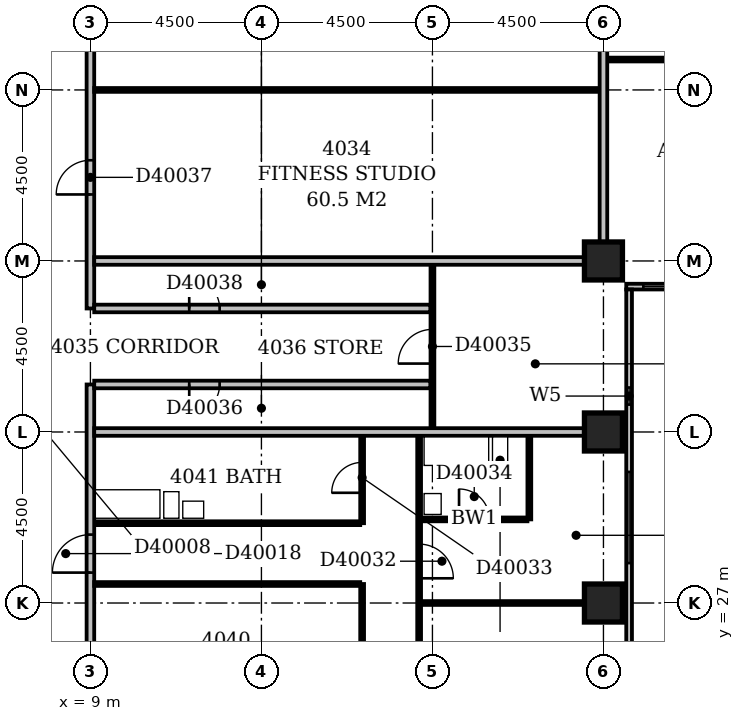
"""IFC4 building model, lengths in metres.
Left out: names, types, materials, properties, quantities, classifications, styles, units other than length and angle.
Written with IfcOpenShell. Run it as: python <this file> out.ifc"""

import sys

from ifc_helpers import new_model, si_unit, direction, frame, frame_2d, origin, origin_2d, place, context, subcontext, project, spatial, rectangle, extrude, element, fill, save


model = new_model("IFC4")
c1 = context("Model", 3, precision=1e-05, world=origin(), true_north=direction((0.0, 1.0)))
c2 = subcontext(c1, "Body", "Model", "MODEL_VIEW")
j1 = project(units=[si_unit("LENGTHUNIT", "METRE"), si_unit("PLANEANGLEUNIT", "RADIAN")], contexts=[c1])
p1 = place(None, origin())
s1 = spatial("IfcSite", under=j1, at=p1, CompositionType="ELEMENT")
p2 = place(p1, origin())
s2 = spatial("IfcBuilding", under=s1, at=p2, CompositionType="ELEMENT")
p3 = place(p2, frame((0.0, 0.0, 159.2)))
s3 = spatial("IfcBuildingStorey", under=s2, at=p3, CompositionType="ELEMENT", Elevation=159.2)
for number, where, z_axis, x_axis in (
    (1, (22.5, 27.0, -0.3), (0.0, 0.0, 1.0), (1.0, 0.0, 0.0)),
    (2, (22.5, 31.5, -0.3), (0.0, 0.0, 1.0), (1.0, 0.0, 0.0)),
    (3, (22.5, 36.0, -0.3), (0.0, 0.0, 1.0), (1.0, 0.0, 0.0)),
):
    element("IfcColumn", number, at=place(p3, frame(where, z_axis=z_axis, x_axis=x_axis)), inside=s3, PredefinedType="COLUMN", context=c2, shape_type="SweptSolid", body=[
        extrude(rectangle(XDim=1.0, YDim=1.0, at=origin_2d()), origin(), (0.0, 0.0, 1.0), 3.6),
    ])
p4 = place(p3, frame((23.175, 17.4, 0.0), z_axis=(0.0, 0.0, 1.0), x_axis=(0.0, 1.0, 0.0)))
e4 = element("IfcWall", 4, at=p4, inside=s3, PredefinedType="STANDARD", context=c2, shape_type="SweptSolid", body=[
    extrude(rectangle(XDim=17.85, YDim=0.15, at=frame_2d((8.925, 0.0))), origin(), (0.0, 0.0, 1.0), 2.7),
])
p5 = place(p4, frame((1.65, 0.0, 0.6)))
e5 = element("IfcOpeningElement", 5, at=p5, cuts=e4, PredefinedType="OPENING", context=c2, shape_type="SweptSolid", body=[
    extrude(rectangle(XDim=2.4, YDim=1.8, at=frame_2d((1.2, 0.9))), frame((0.0, 0.087, 0.0), z_axis=(0.0, -1.0, 0.0), x_axis=(1.0, 0.0, 0.0)), (0.0, 0.0, 1.0), 0.174),
])
p6 = place(p4, frame((6.15, 0.0, 0.6)))
e6 = element("IfcOpeningElement", 6, at=p6, cuts=e4, PredefinedType="OPENING", context=c2, shape_type="SweptSolid", body=[
    extrude(rectangle(XDim=2.4, YDim=1.8, at=frame_2d((1.2, 0.9))), frame((0.0, 0.087, 0.0), z_axis=(0.0, -1.0, 0.0), x_axis=(1.0, 0.0, 0.0)), (0.0, 0.0, 1.0), 0.174),
])
p7 = place(p4, frame((10.65, 0.0, 0.6)))
e7 = element("IfcOpeningElement", 7, at=p7, cuts=e4, PredefinedType="OPENING", context=c2, shape_type="SweptSolid", body=[
    extrude(rectangle(XDim=2.4, YDim=1.8, at=frame_2d((1.2, 0.9))), frame((0.0, 0.087, 0.0), z_axis=(0.0, -1.0, 0.0), x_axis=(1.0, 0.0, 0.0)), (0.0, 0.0, 1.0), 0.174),
])
p8 = place(p4, frame((14.82, 0.0, 0.6)))
e8 = element("IfcOpeningElement", 8, at=p8, cuts=e4, PredefinedType="OPENING", context=c2, shape_type="SweptSolid", body=[
    extrude(rectangle(XDim=0.45, YDim=1.8, at=frame_2d((0.225, 0.9))), frame((0.0, 0.087, 0.0), z_axis=(0.0, -1.0, 0.0), x_axis=(1.0, 0.0, 0.0)), (0.0, 0.0, 1.0), 0.174),
])
p9 = place(p3, frame((23.1, 35.325, 0.0), z_axis=(0.0, 0.0, 1.0), x_axis=(1.0, 0.0, 0.0)))
e9 = element("IfcWall", 9, at=p9, inside=s3, PredefinedType="STANDARD", context=c2, shape_type="SweptSolid", body=[
    extrude(rectangle(XDim=45.15, YDim=0.15, at=frame_2d((22.575, 0.0))), origin(), (0.0, 0.0, 1.0), 2.7),
])
p10 = place(p9, frame((0.45, 0.0, 0.6)))
e10 = element("IfcOpeningElement", 10, at=p10, cuts=e9, PredefinedType="OPENING", context=c2, shape_type="SweptSolid", body=[
    extrude(rectangle(XDim=2.4, YDim=1.8, at=frame_2d((1.2, 0.9))), frame((0.0, 0.087, 0.0), z_axis=(0.0, -1.0, 0.0), x_axis=(1.0, 0.0, 0.0)), (0.0, 0.0, 1.0), 0.174),
])
p11 = place(p9, frame((4.95, 0.0, 0.6)))
e11 = element("IfcOpeningElement", 11, at=p11, cuts=e9, PredefinedType="OPENING", context=c2, shape_type="SweptSolid", body=[
    extrude(rectangle(XDim=2.4, YDim=1.8, at=frame_2d((1.2, 0.9))), frame((0.0, 0.087, 0.0), z_axis=(0.0, -1.0, 0.0), x_axis=(1.0, 0.0, 0.0)), (0.0, 0.0, 1.0), 0.174),
])
p12 = place(p9, frame((9.22, 0.0, 0.6)))
e12 = element("IfcOpeningElement", 12, at=p12, cuts=e9, PredefinedType="OPENING", context=c2, shape_type="SweptSolid", body=[
    extrude(rectangle(XDim=1.8, YDim=1.8, at=frame_2d((0.9, 0.9))), frame((0.0, 0.087, 0.0), z_axis=(0.0, -1.0, 0.0), x_axis=(1.0, 0.0, 0.0)), (0.0, 0.0, 1.0), 0.174),
])
p13 = place(p9, frame((14.84, 0.0, 0.6)))
e13 = element("IfcOpeningElement", 13, at=p13, cuts=e9, PredefinedType="OPENING", context=c2, shape_type="SweptSolid", body=[
    extrude(rectangle(XDim=1.8, YDim=1.8, at=frame_2d((0.9, 0.9))), frame((0.0, 0.087, 0.0), z_axis=(0.0, -1.0, 0.0), x_axis=(1.0, 0.0, 0.0)), (0.0, 0.0, 1.0), 0.174),
])
p14 = place(p9, frame((18.45, 0.0, 0.6)))
e14 = element("IfcOpeningElement", 14, at=p14, cuts=e9, PredefinedType="OPENING", context=c2, shape_type="SweptSolid", body=[
    extrude(rectangle(XDim=2.4, YDim=1.8, at=frame_2d((1.2, 0.9))), frame((0.0, 0.087, 0.0), z_axis=(0.0, -1.0, 0.0), x_axis=(1.0, 0.0, 0.0)), (0.0, 0.0, 1.0), 0.174),
])
p15 = place(p9, frame((22.95, 0.0, 0.6)))
e15 = element("IfcOpeningElement", 15, at=p15, cuts=e9, PredefinedType="OPENING", context=c2, shape_type="SweptSolid", body=[
    extrude(rectangle(XDim=2.4, YDim=1.8, at=frame_2d((1.2, 0.9))), frame((0.0, 0.087, 0.0), z_axis=(0.0, -1.0, 0.0), x_axis=(1.0, 0.0, 0.0)), (0.0, 0.0, 1.0), 0.174),
])
p16 = place(p9, frame((27.45, 0.0, 0.6)))
e16 = element("IfcOpeningElement", 16, at=p16, cuts=e9, PredefinedType="OPENING", context=c2, shape_type="SweptSolid", body=[
    extrude(rectangle(XDim=2.4, YDim=1.8, at=frame_2d((1.2, 0.9))), frame((0.0, 0.087, 0.0), z_axis=(0.0, -1.0, 0.0), x_axis=(1.0, 0.0, 0.0)), (0.0, 0.0, 1.0), 0.174),
])
p17 = place(p9, frame((31.95, 0.0, 0.6)))
e17 = element("IfcOpeningElement", 17, at=p17, cuts=e9, PredefinedType="OPENING", context=c2, shape_type="SweptSolid", body=[
    extrude(rectangle(XDim=2.4, YDim=1.8, at=frame_2d((1.2, 0.9))), frame((0.0, 0.087, 0.0), z_axis=(0.0, -1.0, 0.0), x_axis=(1.0, 0.0, 0.0)), (0.0, 0.0, 1.0), 0.174),
])
p18 = place(p9, frame((36.45, 0.0, 0.6)))
e18 = element("IfcOpeningElement", 18, at=p18, cuts=e9, PredefinedType="OPENING", context=c2, shape_type="SweptSolid", body=[
    extrude(rectangle(XDim=2.4, YDim=1.8, at=frame_2d((1.2, 0.9))), frame((0.0, 0.087, 0.0), z_axis=(0.0, -1.0, 0.0), x_axis=(1.0, 0.0, 0.0)), (0.0, 0.0, 1.0), 0.174),
])
p19 = place(p9, frame((40.689, 0.0, 0.6)))
e19 = element("IfcOpeningElement", 19, at=p19, cuts=e9, PredefinedType="OPENING", context=c2, shape_type="SweptSolid", body=[
    extrude(rectangle(XDim=1.2, YDim=1.8, at=frame_2d((0.6, 0.9))), frame((0.0, 0.087, 0.0), z_axis=(0.0, -1.0, 0.0), x_axis=(1.0, 0.0, 0.0)), (0.0, 0.0, 1.0), 0.174),
])
p20 = place(p3, frame((9.0, 5.0, 0.0), z_axis=(0.0, 0.0, 1.0), x_axis=(0.0, 1.0, 0.0)))
e20 = element("IfcWall", 20, at=p20, inside=s3, PredefinedType="PARTITIONING", context=c2, shape_type="SweptSolid", body=[
    extrude(rectangle(XDim=27.75, YDim=0.2, at=frame_2d((13.875, 0.0))), origin(), (0.0, 0.0, 1.0), 3.3),
])
p21 = place(p20, frame((22.8, 0.0, 0.0)))
e21 = element("IfcOpeningElement", 21, at=p21, cuts=e20, PredefinedType="OPENING", context=c2, shape_type="SweptSolid", body=[
    extrude(rectangle(XDim=1.0, YDim=2.1, at=frame_2d((0.5, 1.05))), frame((0.0, 0.112, 0.0), z_axis=(0.0, -1.0, 0.0), x_axis=(1.0, 0.0, 0.0)), (0.0, 0.0, 1.0), 0.224),
])
p22 = place(p20, frame((14.95, 0.0, 0.0)))
e22 = element("IfcOpeningElement", 22, at=p22, cuts=e20, PredefinedType="OPENING", context=c2, shape_type="SweptSolid", body=[
    extrude(rectangle(XDim=1.0, YDim=2.1, at=frame_2d((0.5, 1.05))), frame((0.0, 0.112, 0.0), z_axis=(0.0, -1.0, 0.0), x_axis=(1.0, 0.0, 0.0)), (0.0, 0.0, 1.0), 0.224),
])
p23 = place(p20, frame((9.3, 0.0, 0.0)))
e23 = element("IfcOpeningElement", 23, at=p23, cuts=e20, PredefinedType="OPENING", context=c2, shape_type="SweptSolid", body=[
    extrude(rectangle(XDim=1.0, YDim=2.1, at=frame_2d((0.5, 1.05))), frame((0.0, 0.112, 0.0), z_axis=(0.0, -1.0, 0.0), x_axis=(1.0, 0.0, 0.0)), (0.0, 0.0, 1.0), 0.224),
])
p24 = place(p20, frame((1.5, 0.0, 0.0)))
e24 = element("IfcOpeningElement", 24, at=p24, cuts=e20, PredefinedType="OPENING", context=c2, shape_type="SweptSolid", body=[
    extrude(rectangle(XDim=0.9, YDim=2.1, at=frame_2d((0.45, 1.05))), frame((0.0, 0.112, 0.0), z_axis=(0.0, -1.0, 0.0), x_axis=(1.0, 0.0, 0.0)), (0.0, 0.0, 1.0), 0.224),
])
p25 = place(p3, frame((16.15, 22.6, 0.0), z_axis=(0.0, 0.0, 1.0), x_axis=(0.0, 1.0, 0.0)))
e25 = element("IfcWall", 25, at=p25, inside=s3, PredefinedType="PARTITIONING", context=c2, shape_type="SweptSolid", body=[
    extrude(rectangle(XDim=4.9, YDim=0.1, at=frame_2d((2.45, 0.0))), origin(), (0.0, 0.0, 1.0), 3.3),
])
p26 = place(p25, frame((1.95, 0.0, 0.0)))
e26 = element("IfcOpeningElement", 26, at=p26, cuts=e25, PredefinedType="OPENING", context=c2, shape_type="SweptSolid", body=[
    extrude(rectangle(XDim=0.9, YDim=2.1, at=frame_2d((0.45, 1.05))), frame((0.0, 0.062, 0.0), z_axis=(0.0, -1.0, 0.0), x_axis=(1.0, 0.0, 0.0)), (0.0, 0.0, 1.0), 0.124),
])
p27 = place(p3, frame((17.65, 22.6, 0.0), z_axis=(0.0, 0.0, 1.0), x_axis=(0.0, 1.0, 0.0)))
e27 = element("IfcWall", 27, at=p27, inside=s3, PredefinedType="PARTITIONING", context=c2, shape_type="SweptSolid", body=[
    extrude(rectangle(XDim=8.8, YDim=0.1, at=frame_2d((4.4, 0.0))), origin(), (0.0, 0.0, 1.0), 3.3),
])
p28 = place(p27, frame((1.7, 0.0, 0.0)))
e28 = element("IfcOpeningElement", 28, at=p28, cuts=e27, PredefinedType="OPENING", context=c2, shape_type="SweptSolid", body=[
    extrude(rectangle(XDim=0.9, YDim=2.1, at=frame_2d((0.45, 1.05))), frame((0.0, 0.062, 0.0), z_axis=(0.0, -1.0, 0.0), x_axis=(1.0, 0.0, 0.0)), (0.0, 0.0, 1.0), 0.124),
])
p29 = place(p27, frame((5.05, 0.0, 0.0)))
e29 = element("IfcOpeningElement", 29, at=p29, cuts=e27, PredefinedType="OPENING", context=c2, shape_type="SweptSolid", body=[
    extrude(rectangle(XDim=0.9, YDim=2.1, at=frame_2d((0.45, 1.05))), frame((0.0, 0.062, 0.0), z_axis=(0.0, -1.0, 0.0), x_axis=(1.0, 0.0, 0.0)), (0.0, 0.0, 1.0), 0.124),
])
p30 = place(p3, frame((17.7, 27.0, 0.0), z_axis=(0.0, 0.0, 1.0), x_axis=(1.0, 0.0, 0.0)))
e30 = element("IfcWall", 30, at=p30, inside=s3, PredefinedType="PARTITIONING", context=c2, shape_type="SweptSolid", body=[
    extrude(rectangle(XDim=4.3, YDim=0.1, at=frame_2d((2.15, 0.0))), origin(), (0.0, 0.0, 1.0), 2.7),
])
p31 = place(p3, frame((9.1, 27.5, 0.0), z_axis=(0.0, 0.0, 1.0), x_axis=(1.0, 0.0, 0.0)))
e31 = element("IfcWall", 31, at=p31, inside=s3, PredefinedType="PARTITIONING", context=c2, shape_type="SweptSolid", body=[
    extrude(rectangle(XDim=7.0, YDim=0.1, at=frame_2d((3.5, 0.0))), origin(), (0.0, 0.0, 1.0), 2.7),
])
p32 = place(p3, frame((9.1, 29.1, 0.0), z_axis=(0.0, 0.0, 1.0), x_axis=(1.0, 0.0, 0.0)))
e32 = element("IfcWall", 32, at=p32, inside=s3, PredefinedType="PLUMBINGWALL", context=c2, shape_type="SweptSolid", body=[
    extrude(rectangle(XDim=7.0, YDim=0.1, at=frame_2d((3.5, 0.0))), origin(), (0.0, 0.0, 1.0), 3.3),
])
p33 = place(p3, frame((16.15, 29.1, 0.0), z_axis=(0.0, 0.0, 1.0), x_axis=(0.0, 1.0, 0.0)))
e33 = element("IfcWall", 33, at=p33, inside=s3, PredefinedType="PARTITIONING", context=c2, shape_type="SweptSolid", body=[
    extrude(rectangle(XDim=2.3, YDim=0.1, at=frame_2d((1.15, 0.0))), origin(), (0.0, 0.0, 1.0), 3.3),
])
p34 = place(p33, frame((0.8, 0.0, 0.0)))
e34 = element("IfcOpeningElement", 34, at=p34, cuts=e33, PredefinedType="OPENING", context=c2, shape_type="SweptSolid", body=[
    extrude(rectangle(XDim=0.8, YDim=2.1, at=frame_2d((0.4, 1.05))), frame((0.0, 0.062, 0.0), z_axis=(0.0, -1.0, 0.0), x_axis=(1.0, 0.0, 0.0)), (0.0, 0.0, 1.0), 0.124),
])
p35 = place(p3, frame((17.7, 29.2, 0.0), z_axis=(0.0, 0.0, 1.0), x_axis=(1.0, 0.0, 0.0)))
e35 = element("IfcWall", 35, at=p35, inside=s3, PredefinedType="PLUMBINGWALL", context=c2, shape_type="SweptSolid", body=[
    extrude(rectangle(XDim=2.8, YDim=0.1, at=frame_2d((1.4, 0.0))), origin(), (0.0, 0.0, 1.0), 3.3),
])
p36 = place(p35, frame((1.0, 0.0, 0.0)))
e36 = element("IfcOpeningElement", 36, at=p36, cuts=e35, PredefinedType="OPENING", context=c2, shape_type="SweptSolid", body=[
    extrude(rectangle(XDim=0.8, YDim=2.1, at=frame_2d((0.4, 1.05))), frame((0.0, 0.062, 0.0), z_axis=(0.0, -1.0, 0.0), x_axis=(1.0, 0.0, 0.0)), (0.0, 0.0, 1.0), 0.124),
])
p37 = place(p3, frame((20.55, 29.2, 0.0), z_axis=(0.0, 0.0, 1.0), x_axis=(0.0, 1.0, 0.0)))
e37 = element("IfcWall", 37, at=p37, inside=s3, PredefinedType="PLUMBINGWALL", context=c2, shape_type="SweptSolid", body=[
    extrude(rectangle(XDim=2.2, YDim=0.1, at=frame_2d((1.1, 0.0))), origin(), (0.0, 0.0, 1.0), 3.3),
])
p38 = place(p3, frame((9.1, 31.5, 0.0), z_axis=(0.0, 0.0, 1.0), x_axis=(1.0, 0.0, 0.0)))
e38 = element("IfcWall", 38, at=p38, inside=s3, PredefinedType="PARTITIONING", context=c2, shape_type="SweptSolid", body=[
    extrude(rectangle(XDim=12.9, YDim=0.2, at=frame_2d((6.45, 0.0))), origin(), (0.0, 0.0, 1.0), 3.3),
])
p39 = place(p3, frame((18.0, 31.6, 0.0), z_axis=(0.0, 0.0, 1.0), x_axis=(0.0, 1.0, 0.0)))
e39 = element("IfcWall", 39, at=p39, inside=s3, PredefinedType="PARTITIONING", context=c2, shape_type="SweptSolid", body=[
    extrude(rectangle(XDim=4.3, YDim=0.1, at=frame_2d((2.15, 0.0))), origin(), (0.0, 0.0, 1.0), 3.3),
])
p40 = place(p39, frame((1.7, 0.0, 0.0)))
e40 = element("IfcOpeningElement", 40, at=p40, cuts=e39, PredefinedType="OPENING", context=c2, shape_type="SweptSolid", body=[
    extrude(rectangle(XDim=0.9, YDim=2.1, at=frame_2d((0.45, 1.05))), frame((0.0, 0.062, 0.0), z_axis=(0.0, -1.0, 0.0), x_axis=(1.0, 0.0, 0.0)), (0.0, 0.0, 1.0), 0.124),
])
p41 = place(p3, frame((9.1, 32.75, 0.0), z_axis=(0.0, 0.0, 1.0), x_axis=(1.0, 0.0, 0.0)))
e41 = element("IfcWall", 41, at=p41, inside=s3, PredefinedType="PARTITIONING", context=c2, shape_type="SweptSolid", body=[
    extrude(rectangle(XDim=8.85, YDim=0.2, at=frame_2d((4.425, 0.0))), origin(), (0.0, 0.0, 1.0), 3.3),
])
p42 = place(p41, frame((2.5, 0.0, 0.0)))
e42 = element("IfcOpeningElement", 42, at=p42, cuts=e41, PredefinedType="OPENING", context=c2, shape_type="SweptSolid", body=[
    extrude(rectangle(XDim=0.8, YDim=2.1, at=frame_2d((0.4, 1.05))), frame((0.0, 0.112, 0.0), z_axis=(0.0, -1.0, 0.0), x_axis=(1.0, 0.0, 0.0)), (0.0, 0.0, 1.0), 0.224),
])
p43 = place(p3, frame((9.0, 34.75, 0.0), z_axis=(0.0, 0.0, 1.0), x_axis=(0.0, 1.0, 0.0)))
e43 = element("IfcWall", 43, at=p43, inside=s3, PredefinedType="PARTITIONING", context=c2, shape_type="SweptSolid", body=[
    extrude(rectangle(XDim=14.75, YDim=0.2, at=frame_2d((7.375, 0.0))), origin(), (0.0, 0.0, 1.0), 3.3),
])
p44 = place(p43, frame((3.0, 0.0, 0.0)))
e44 = element("IfcOpeningElement", 44, at=p44, cuts=e43, PredefinedType="OPENING", context=c2, shape_type="SweptSolid", body=[
    extrude(rectangle(XDim=0.9, YDim=2.1, at=frame_2d((0.45, 1.05))), frame((0.0, 0.112, 0.0), z_axis=(0.0, -1.0, 0.0), x_axis=(1.0, 0.0, 0.0)), (0.0, 0.0, 1.0), 0.224),
])
p45 = place(p3, frame((9.1, 34.75, 0.0), z_axis=(0.0, 0.0, 1.0), x_axis=(1.0, 0.0, 0.0)))
e45 = element("IfcWall", 45, at=p45, inside=s3, PredefinedType="PARTITIONING", context=c2, shape_type="SweptSolid", body=[
    extrude(rectangle(XDim=8.85, YDim=0.2, at=frame_2d((4.425, 0.0))), origin(), (0.0, 0.0, 1.0), 3.3),
])
p46 = place(p45, frame((2.5, 0.0, 0.0)))
e46 = element("IfcOpeningElement", 46, at=p46, cuts=e45, PredefinedType="OPENING", context=c2, shape_type="SweptSolid", body=[
    extrude(rectangle(XDim=0.8, YDim=2.1, at=frame_2d((0.4, 1.05))), frame((0.0, 0.112, 0.0), z_axis=(0.0, -1.0, 0.0), x_axis=(1.0, 0.0, 0.0)), (0.0, 0.0, 1.0), 0.224),
])
for number, where, z_axis, x_axis in (
    (47, (9.1, 36.0, 0.0), (0.0, 0.0, 1.0), (1.0, 0.0, 0.0)),
    (48, (22.5, 36.5, 0.0), (0.0, 0.0, 1.0), (0.0, 1.0, 0.0)),
):
    element("IfcWall", number, at=place(p3, frame(where, z_axis=z_axis, x_axis=x_axis)), inside=s3, PredefinedType="PARTITIONING", context=c2, shape_type="SweptSolid", body=[
        extrude(rectangle(XDim=12.9, YDim=0.2, at=frame_2d((6.45, 0.0))), origin(), (0.0, 0.0, 1.0), 3.3),
    ])
p47 = place(p3, frame((9.1, 40.5, 0.0), z_axis=(0.0, 0.0, 1.0), x_axis=(1.0, 0.0, 0.0)))
e49 = element("IfcWall", 49, at=p47, inside=s3, PredefinedType="PARTITIONING", context=c2, shape_type="SweptSolid", body=[
    extrude(rectangle(XDim=13.3, YDim=0.1, at=frame_2d((6.65, 0.0))), origin(), (0.0, 0.0, 1.0), 3.3),
])
p48 = place(p3, frame((22.6, 41.3, 0.0), z_axis=(0.0, 0.0, 1.0), x_axis=(1.0, 0.0, 0.0)))
e50 = element("IfcWall", 50, at=p48, inside=s3, PredefinedType="PARTITIONING", context=c2, shape_type="SweptSolid", body=[
    extrude(rectangle(XDim=17.8, YDim=0.1, at=frame_2d((8.9, 0.0))), origin(), (0.0, 0.0, 1.0), 3.3),
])
p49 = place(p48, frame((3.9, 0.0, 0.0)))
e51 = element("IfcOpeningElement", 51, at=p49, cuts=e50, PredefinedType="OPENING", context=c2, shape_type="SweptSolid", body=[
    extrude(rectangle(XDim=0.9, YDim=2.1, at=frame_2d((0.45, 1.05))), frame((0.0, 0.062, 0.0), z_axis=(0.0, -1.0, 0.0), x_axis=(1.0, 0.0, 0.0)), (0.0, 0.0, 1.0), 0.124),
])
p50 = place(p48, frame((10.7, 0.0, 0.0)))
e52 = element("IfcOpeningElement", 52, at=p50, cuts=e50, PredefinedType="OPENING", context=c2, shape_type="SweptSolid", body=[
    extrude(rectangle(XDim=0.9, YDim=2.1, at=frame_2d((0.45, 1.05))), frame((0.0, 0.062, 0.0), z_axis=(0.0, -1.0, 0.0), x_axis=(1.0, 0.0, 0.0)), (0.0, 0.0, 1.0), 0.124),
])
p51 = place(p48, frame((14.05, 0.0, 0.0)))
e53 = element("IfcOpeningElement", 53, at=p51, cuts=e50, PredefinedType="OPENING", context=c2, shape_type="SweptSolid", body=[
    extrude(rectangle(XDim=0.9, YDim=2.1, at=frame_2d((0.45, 1.05))), frame((0.0, 0.062, 0.0), z_axis=(0.0, -1.0, 0.0), x_axis=(1.0, 0.0, 0.0)), (0.0, 0.0, 1.0), 0.124),
])
p52 = place(p7, origin())
e54 = element("IfcWindow", 54, at=p52, inside=s3, PartitioningType="SINGLE_PANEL", PredefinedType="WINDOW", context=c2, shape_type="SweptSolid", body=[
    extrude(rectangle(XDim=2.4, YDim=1.8, at=frame_2d((1.2, 0.9))), frame((0.0, 0.03, 0.0), z_axis=(0.0, -1.0, 0.0), x_axis=(1.0, 0.0, 0.0)), (0.0, 0.0, 1.0), 0.06),
])
fill(e7, e54)
p53 = place(p8, origin())
e55 = element("IfcWindow", 55, at=p53, inside=s3, PartitioningType="SINGLE_PANEL", PredefinedType="WINDOW", context=c2, shape_type="SweptSolid", body=[
    extrude(rectangle(XDim=0.45, YDim=1.8, at=frame_2d((0.225, 0.9))), frame((0.0, 0.03, 0.0), z_axis=(0.0, -1.0, 0.0), x_axis=(1.0, 0.0, 0.0)), (0.0, 0.0, 1.0), 0.06),
])
fill(e8, e55)
p54 = place(p10, origin())
e56 = element("IfcWindow", 56, at=p54, inside=s3, PartitioningType="SINGLE_PANEL", PredefinedType="WINDOW", context=c2, shape_type="SweptSolid", body=[
    extrude(rectangle(XDim=2.4, YDim=1.8, at=frame_2d((1.2, 0.9))), frame((0.0, 0.03, 0.0), z_axis=(0.0, -1.0, 0.0), x_axis=(1.0, 0.0, 0.0)), (0.0, 0.0, 1.0), 0.06),
])
fill(e10, e56)
p55 = place(p21, origin())
e57 = element("IfcDoor", 57, at=p55, inside=s3, OperationType="SINGLE_SWING_LEFT", PredefinedType="DOOR", context=c2, shape_type="SweptSolid", body=[
    extrude(rectangle(XDim=1.0, YDim=2.1, at=frame_2d((0.5, 1.05))), frame((0.0, 0.025, 0.0), z_axis=(0.0, -1.0, 0.0), x_axis=(1.0, 0.0, 0.0)), (0.0, 0.0, 1.0), 0.05),
])
fill(e21, e57)
p56 = place(p29, frame((0.9, 0.0, 0.0), z_axis=(0.0, 0.0, 1.0), x_axis=(-1.0, 0.0, 0.0)))
e58 = element("IfcDoor", 58, at=p56, inside=s3, OperationType="SINGLE_SWING_RIGHT", PredefinedType="DOOR", context=c2, shape_type="SweptSolid", body=[
    extrude(rectangle(XDim=0.9, YDim=2.1, at=frame_2d((0.45, 1.05))), frame((0.0, 0.025, 0.0), z_axis=(0.0, -1.0, 0.0), x_axis=(1.0, 0.0, 0.0)), (0.0, 0.0, 1.0), 0.05),
])
fill(e29, e58)
p57 = place(p34, origin())
e59 = element("IfcDoor", 59, at=p57, inside=s3, OperationType="SINGLE_SWING_LEFT", PredefinedType="DOOR", context=c2, shape_type="SweptSolid", body=[
    extrude(rectangle(XDim=0.8, YDim=2.1, at=frame_2d((0.4, 1.05))), frame((0.0, 0.025, 0.0), z_axis=(0.0, -1.0, 0.0), x_axis=(1.0, 0.0, 0.0)), (0.0, 0.0, 1.0), 0.05),
])
fill(e34, e59)
p58 = place(p36, origin())
e60 = element("IfcDoor", 60, at=p58, inside=s3, OperationType="SINGLE_SWING_LEFT", PredefinedType="DOOR", context=c2, shape_type="SweptSolid", body=[
    extrude(rectangle(XDim=0.8, YDim=2.1, at=frame_2d((0.4, 1.05))), frame((0.0, 0.025, 0.0), z_axis=(0.0, -1.0, 0.0), x_axis=(1.0, 0.0, 0.0)), (0.0, 0.0, 1.0), 0.05),
])
fill(e36, e60)
p59 = place(p40, origin())
e61 = element("IfcDoor", 61, at=p59, inside=s3, OperationType="SINGLE_SWING_LEFT", PredefinedType="DOOR", context=c2, shape_type="SweptSolid", body=[
    extrude(rectangle(XDim=0.9, YDim=2.1, at=frame_2d((0.45, 1.05))), frame((0.0, 0.025, 0.0), z_axis=(0.0, -1.0, 0.0), x_axis=(1.0, 0.0, 0.0)), (0.0, 0.0, 1.0), 0.05),
])
fill(e40, e61)
p60 = place(p42, frame((0.8, 0.0, 0.0), z_axis=(0.0, 0.0, 1.0), x_axis=(-1.0, 0.0, 0.0)))
e62 = element("IfcDoor", 62, at=p60, inside=s3, OperationType="SINGLE_SWING_RIGHT", PredefinedType="DOOR", context=c2, shape_type="SweptSolid", body=[
    extrude(rectangle(XDim=0.8, YDim=2.1, at=frame_2d((0.4, 1.05))), frame((0.0, 0.025, 0.0), z_axis=(0.0, -1.0, 0.0), x_axis=(1.0, 0.0, 0.0)), (0.0, 0.0, 1.0), 0.05),
])
fill(e42, e62)
p61 = place(p44, origin())
e63 = element("IfcDoor", 63, at=p61, inside=s3, OperationType="SINGLE_SWING_LEFT", PredefinedType="DOOR", context=c2, shape_type="SweptSolid", body=[
    extrude(rectangle(XDim=0.9, YDim=2.1, at=frame_2d((0.45, 1.05))), frame((0.0, 0.025, 0.0), z_axis=(0.0, -1.0, 0.0), x_axis=(1.0, 0.0, 0.0)), (0.0, 0.0, 1.0), 0.05),
])
fill(e44, e63)
p62 = place(p46, origin())
e64 = element("IfcDoor", 64, at=p62, inside=s3, OperationType="SINGLE_SWING_LEFT", PredefinedType="DOOR", context=c2, shape_type="SweptSolid", body=[
    extrude(rectangle(XDim=0.8, YDim=2.1, at=frame_2d((0.4, 1.05))), frame((0.0, 0.025, 0.0), z_axis=(0.0, -1.0, 0.0), x_axis=(1.0, 0.0, 0.0)), (0.0, 0.0, 1.0), 0.05),
])
fill(e46, e64)
save(model, sys.argv[1])
